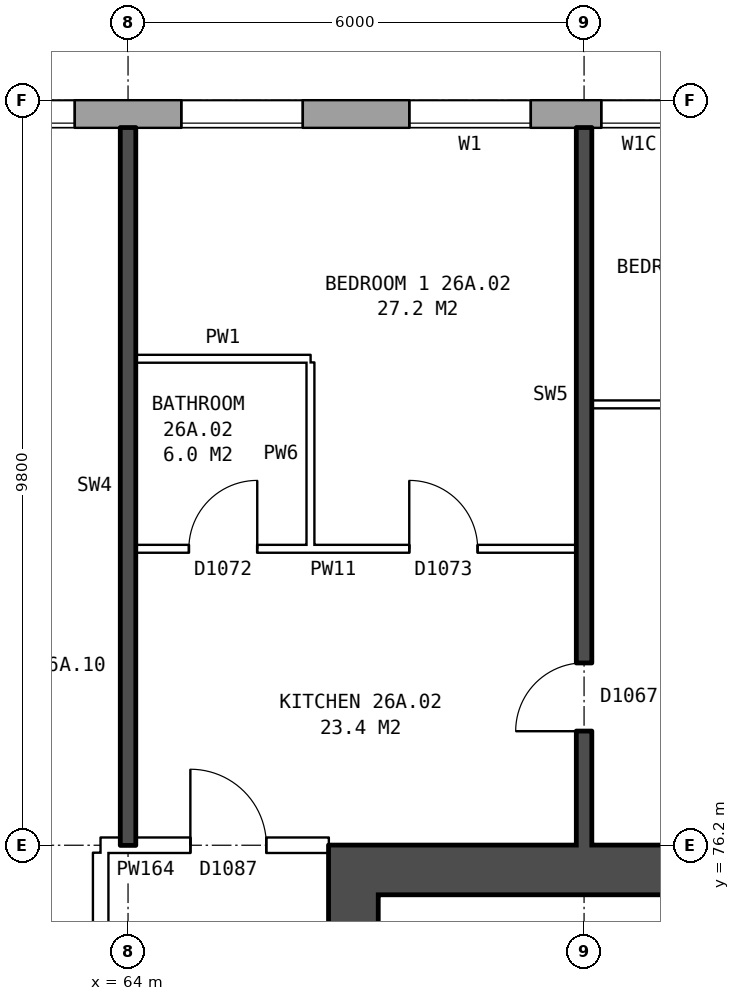
"""IFC4 building model, lengths in metres.
Left out: names, types, materials, properties, quantities, classifications, styles, units other than length and angle.
Written with IfcOpenShell. Run it as: python <this file> out.ifc"""

import sys

from ifc_helpers import new_model, si_unit, direction, frame, frame_2d, origin, place, context, subcontext, project, spatial, rectangle, extrude, element, fill, save


model = new_model("IFC4")
c1 = context("Model", 3, precision=1e-05, world=origin(), true_north=direction((0.0, 1.0)))
c2 = subcontext(c1, "Body", "Model", "MODEL_VIEW")
j1 = project(units=[si_unit("LENGTHUNIT", "METRE"), si_unit("PLANEANGLEUNIT", "RADIAN")], contexts=[c1])
p1 = place(None, origin())
s1 = spatial("IfcSite", under=j1, at=p1, CompositionType="ELEMENT")
p2 = place(p1, origin())
s2 = spatial("IfcBuilding", under=s1, at=p2, CompositionType="ELEMENT")
p3 = place(p2, frame((0.0, 0.0, 96.4)))
s3 = spatial("IfcBuildingStorey", under=s2, at=p3, CompositionType="ELEMENT", Elevation=96.4)
p4 = place(p3, frame((72.925, 85.82, 0.0), z_axis=(0.0, 0.0, 1.0), x_axis=(-1.0, 0.0, 0.0)))
e1 = element("IfcWall", 1, at=p4, inside=s3, PredefinedType="STANDARD", context=c2, shape_type="SweptSolid", body=[
    extrude(rectangle(XDim=44.851, YDim=0.36, at=frame_2d((22.425, 0.0))), origin(), (0.0, 0.0, 1.0), 2.85),
])
p5 = place(p4, frame((0.4, 0.0, 0.8)))
e2 = element("IfcOpeningElement", 2, at=p5, cuts=e1, PredefinedType="OPENING", context=c2, shape_type="SweptSolid", body=[
    extrude(rectangle(XDim=1.0, YDim=0.9, at=frame_2d((0.5, 0.45))), frame((0.0, 0.19, 0.0), z_axis=(0.0, -1.0, 0.0), x_axis=(1.0, 0.0, 0.0)), (0.0, 0.0, 1.0), 0.38),
])
p6 = place(p4, frame((3.625, 0.0, 0.8)))
e3 = element("IfcOpeningElement", 3, at=p6, cuts=e1, PredefinedType="OPENING", context=c2, shape_type="SweptSolid", body=[
    extrude(rectangle(XDim=1.6, YDim=1.8, at=frame_2d((0.8, 0.9))), frame((0.0, 0.19, 0.0), z_axis=(0.0, -1.0, 0.0), x_axis=(1.0, 0.0, 0.0)), (0.0, 0.0, 1.0), 0.38),
])
p7 = place(p4, frame((6.625, 0.0, 0.8)))
e4 = element("IfcOpeningElement", 4, at=p7, cuts=e1, PredefinedType="OPENING", context=c2, shape_type="SweptSolid", body=[
    extrude(rectangle(XDim=1.6, YDim=1.8, at=frame_2d((0.8, 0.9))), frame((0.0, 0.19, 0.0), z_axis=(0.0, -1.0, 0.0), x_axis=(1.0, 0.0, 0.0)), (0.0, 0.0, 1.0), 0.38),
])
p8 = place(p4, frame((9.625, 0.0, 0.8)))
e5 = element("IfcOpeningElement", 5, at=p8, cuts=e1, PredefinedType="OPENING", context=c2, shape_type="SweptSolid", body=[
    extrude(rectangle(XDim=1.6, YDim=1.8, at=frame_2d((0.8, 0.9))), frame((0.0, 0.19, 0.0), z_axis=(0.0, -1.0, 0.0), x_axis=(1.0, 0.0, 0.0)), (0.0, 0.0, 1.0), 0.38),
])
p9 = place(p4, frame((12.625, 0.0, 0.8)))
e6 = element("IfcOpeningElement", 6, at=p9, cuts=e1, PredefinedType="OPENING", context=c2, shape_type="SweptSolid", body=[
    extrude(rectangle(XDim=1.6, YDim=1.8, at=frame_2d((0.8, 0.9))), frame((0.0, 0.19, 0.0), z_axis=(0.0, -1.0, 0.0), x_axis=(1.0, 0.0, 0.0)), (0.0, 0.0, 1.0), 0.38),
])
p10 = place(p4, frame((15.625, 0.0, 0.8)))
e7 = element("IfcOpeningElement", 7, at=p10, cuts=e1, PredefinedType="OPENING", context=c2, shape_type="SweptSolid", body=[
    extrude(rectangle(XDim=1.6, YDim=1.8, at=frame_2d((0.8, 0.9))), frame((0.0, 0.19, 0.0), z_axis=(0.0, -1.0, 0.0), x_axis=(1.0, 0.0, 0.0)), (0.0, 0.0, 1.0), 0.38),
])
p11 = place(p4, frame((18.625, 0.0, 0.8)))
e8 = element("IfcOpeningElement", 8, at=p11, cuts=e1, PredefinedType="OPENING", context=c2, shape_type="SweptSolid", body=[
    extrude(rectangle(XDim=1.6, YDim=1.8, at=frame_2d((0.8, 0.9))), frame((0.0, 0.19, 0.0), z_axis=(0.0, -1.0, 0.0), x_axis=(1.0, 0.0, 0.0)), (0.0, 0.0, 1.0), 0.38),
])
p12 = place(p4, frame((21.625, 0.0, 0.8)))
e9 = element("IfcOpeningElement", 9, at=p12, cuts=e1, PredefinedType="OPENING", context=c2, shape_type="SweptSolid", body=[
    extrude(rectangle(XDim=1.6, YDim=1.8, at=frame_2d((0.8, 0.9))), frame((0.0, 0.19, 0.0), z_axis=(0.0, -1.0, 0.0), x_axis=(1.0, 0.0, 0.0)), (0.0, 0.0, 1.0), 0.38),
])
p13 = place(p4, frame((24.625, 0.0, 0.8)))
e10 = element("IfcOpeningElement", 10, at=p13, cuts=e1, PredefinedType="OPENING", context=c2, shape_type="SweptSolid", body=[
    extrude(rectangle(XDim=1.6, YDim=1.8, at=frame_2d((0.8, 0.9))), frame((0.0, 0.19, 0.0), z_axis=(0.0, -1.0, 0.0), x_axis=(1.0, 0.0, 0.0)), (0.0, 0.0, 1.0), 0.38),
])
p14 = place(p4, frame((27.625, 0.0, 0.8)))
e11 = element("IfcOpeningElement", 11, at=p14, cuts=e1, PredefinedType="OPENING", context=c2, shape_type="SweptSolid", body=[
    extrude(rectangle(XDim=1.6, YDim=1.8, at=frame_2d((0.8, 0.9))), frame((0.0, 0.19, 0.0), z_axis=(0.0, -1.0, 0.0), x_axis=(1.0, 0.0, 0.0)), (0.0, 0.0, 1.0), 0.38),
])
p15 = place(p4, frame((30.625, 0.0, 0.8)))
e12 = element("IfcOpeningElement", 12, at=p15, cuts=e1, PredefinedType="OPENING", context=c2, shape_type="SweptSolid", body=[
    extrude(rectangle(XDim=1.6, YDim=1.8, at=frame_2d((0.8, 0.9))), frame((0.0, 0.19, 0.0), z_axis=(0.0, -1.0, 0.0), x_axis=(1.0, 0.0, 0.0)), (0.0, 0.0, 1.0), 0.38),
])
p16 = place(p4, frame((33.625, 0.0, 0.8)))
e13 = element("IfcOpeningElement", 13, at=p16, cuts=e1, PredefinedType="OPENING", context=c2, shape_type="SweptSolid", body=[
    extrude(rectangle(XDim=1.6, YDim=1.8, at=frame_2d((0.8, 0.9))), frame((0.0, 0.19, 0.0), z_axis=(0.0, -1.0, 0.0), x_axis=(1.0, 0.0, 0.0)), (0.0, 0.0, 1.0), 0.38),
])
p17 = place(p4, frame((36.625, 0.0, 0.8)))
e14 = element("IfcOpeningElement", 14, at=p17, cuts=e1, PredefinedType="OPENING", context=c2, shape_type="SweptSolid", body=[
    extrude(rectangle(XDim=1.6, YDim=1.8, at=frame_2d((0.8, 0.9))), frame((0.0, 0.19, 0.0), z_axis=(0.0, -1.0, 0.0), x_axis=(1.0, 0.0, 0.0)), (0.0, 0.0, 1.0), 0.38),
])
p18 = place(p4, frame((39.625, 0.0, 0.8)))
e15 = element("IfcOpeningElement", 15, at=p18, cuts=e1, PredefinedType="OPENING", context=c2, shape_type="SweptSolid", body=[
    extrude(rectangle(XDim=1.6, YDim=1.8, at=frame_2d((0.8, 0.9))), frame((0.0, 0.19, 0.0), z_axis=(0.0, -1.0, 0.0), x_axis=(1.0, 0.0, 0.0)), (0.0, 0.0, 1.0), 0.38),
])
p19 = place(p4, frame((41.525, 0.0, 0.8)))
e16 = element("IfcOpeningElement", 16, at=p19, cuts=e1, PredefinedType="OPENING", context=c2, shape_type="SweptSolid", body=[
    extrude(rectangle(XDim=1.6, YDim=1.8, at=frame_2d((0.8, 0.9))), frame((0.0, 0.19, 0.0), z_axis=(0.0, -1.0, 0.0), x_axis=(1.0, 0.0, 0.0)), (0.0, 0.0, 1.0), 0.38),
])
p20 = place(p4, frame((1.7, 0.0, 0.8)))
e17 = element("IfcOpeningElement", 17, at=p20, cuts=e1, PredefinedType="OPENING", context=c2, shape_type="SweptSolid", body=[
    extrude(rectangle(XDim=1.0, YDim=1.8, at=frame_2d((0.5, 0.9))), frame((0.0, 0.19, 0.0), z_axis=(0.0, -1.0, 0.0), x_axis=(1.0, 0.0, 0.0)), (0.0, 0.0, 1.0), 0.38),
])
p21 = place(p4, frame((43.425, 0.0, 0.8)))
e18 = element("IfcOpeningElement", 18, at=p21, cuts=e1, PredefinedType="OPENING", context=c2, shape_type="SweptSolid", body=[
    extrude(rectangle(XDim=0.6, YDim=1.2, at=frame_2d((0.3, 0.6))), frame((0.0, 0.19, 0.0), z_axis=(0.0, -1.0, 0.0), x_axis=(1.0, 0.0, 0.0)), (0.0, 0.0, 1.0), 0.38),
])
p22 = place(p3, frame((66.965, 64.45, 0.0), z_axis=(0.0, 0.0, 1.0), x_axis=(0.0, 1.0, 0.0)))
e19 = element("IfcWall", 19, at=p22, inside=s3, PredefinedType="SHEAR", context=c2, shape_type="SweptSolid", body=[
    extrude(rectangle(XDim=11.1, YDim=0.65, at=frame_2d((5.55, 0.0))), origin(), (0.0, 0.0, 1.0), 2.85),
])
p23 = place(p22, frame((0.675, 0.0, 0.0)))
e20 = element("IfcOpeningElement", 20, at=p23, cuts=e19, PredefinedType="OPENING", context=c2, shape_type="SweptSolid", body=[
    extrude(rectangle(XDim=1.1, YDim=2.1, at=frame_2d((0.55, 1.05))), frame((0.0, 0.335, 0.0), z_axis=(0.0, -1.0, 0.0), x_axis=(1.0, 0.0, 0.0)), (0.0, 0.0, 1.0), 0.67),
])
p24 = place(p22, frame((9.25, 0.0, 0.0)))
e21 = element("IfcOpeningElement", 21, at=p24, cuts=e19, PredefinedType="OPENING", context=c2, shape_type="SweptSolid", body=[
    extrude(rectangle(XDim=1.1, YDim=2.1, at=frame_2d((0.55, 1.05))), frame((0.0, 0.335, 0.0), z_axis=(0.0, -1.0, 0.0), x_axis=(1.0, 0.0, 0.0)), (0.0, 0.0, 1.0), 0.67),
])
p25 = place(p3, frame((66.64, 75.875, 0.0), z_axis=(0.0, 0.0, 1.0), x_axis=(1.0, 0.0, 0.0)))
e22 = element("IfcWall", 22, at=p25, inside=s3, PredefinedType="SHEAR", context=c2, shape_type="SweptSolid", body=[
    extrude(rectangle(XDim=9.0, YDim=0.65, at=frame_2d((4.5, 0.0))), origin(), (0.0, 0.0, 1.0), 2.85),
])
p26 = place(p3, frame((63.64, 63.9, 0.0), z_axis=(0.0, 0.0, 1.0), x_axis=(0.0, 1.0, 0.0)))
e23 = element("IfcWall", 23, at=p26, inside=s3, PredefinedType="PARTITIONING", context=c2, shape_type="SweptSolid", body=[
    extrude(rectangle(XDim=12.2, YDim=0.2, at=frame_2d((6.1, 0.0))), origin(), (0.0, 0.0, 1.0), 2.85),
])
p27 = place(p26, frame((5.1, 0.0, 0.0)))
e24 = element("IfcOpeningElement", 24, at=p27, cuts=e23, PredefinedType="OPENING", context=c2, shape_type="SweptSolid", body=[
    extrude(rectangle(XDim=2.0, YDim=2.1, at=frame_2d((1.0, 1.05))), frame((0.0, 0.11, 0.0), z_axis=(0.0, -1.0, 0.0), x_axis=(1.0, 0.0, 0.0)), (0.0, 0.0, 1.0), 0.22),
])
p28 = place(p3, frame((63.64, 76.2, 0.0), z_axis=(0.0, 0.0, 1.0), x_axis=(1.0, 0.0, 0.0)))
e25 = element("IfcWall", 25, at=p28, inside=s3, PredefinedType="PARTITIONING", context=c2, shape_type="SweptSolid", body=[
    extrude(rectangle(XDim=3.0, YDim=0.2, at=frame_2d((1.5, 0.0))), origin(), (0.0, 0.0, 1.0), 2.85),
])
p29 = place(p28, frame((1.18, 0.0, 0.0)))
e26 = element("IfcOpeningElement", 26, at=p29, cuts=e25, PredefinedType="OPENING", context=c2, shape_type="SweptSolid", body=[
    extrude(rectangle(XDim=1.0, YDim=2.1, at=frame_2d((0.5, 1.05))), frame((0.0, 0.11, 0.0), z_axis=(0.0, -1.0, 0.0), x_axis=(1.0, 0.0, 0.0)), (0.0, 0.0, 1.0), 0.22),
])
p30 = place(p3, frame((64.1, 80.1, 0.0), z_axis=(0.0, 0.0, 1.0), x_axis=(1.0, 0.0, 0.0)))
e27 = element("IfcWall", 27, at=p30, inside=s3, PredefinedType="PARTITIONING", context=c2, shape_type="SweptSolid", body=[
    extrude(rectangle(XDim=5.8, YDim=0.1, at=frame_2d((2.9, 0.0))), origin(), (0.0, 0.0, 1.0), 2.85),
])
p31 = place(p30, frame((3.6, 0.0, 0.0)))
e28 = element("IfcOpeningElement", 28, at=p31, cuts=e27, PredefinedType="OPENING", context=c2, shape_type="SweptSolid", body=[
    extrude(rectangle(XDim=0.9, YDim=2.1, at=frame_2d((0.45, 1.05))), frame((0.0, 0.06, 0.0), z_axis=(0.0, -1.0, 0.0), x_axis=(1.0, 0.0, 0.0)), (0.0, 0.0, 1.0), 0.12),
])
p32 = place(p30, frame((0.7, 0.0, 0.0)))
e29 = element("IfcOpeningElement", 29, at=p32, cuts=e27, PredefinedType="OPENING", context=c2, shape_type="SweptSolid", body=[
    extrude(rectangle(XDim=0.9, YDim=2.1, at=frame_2d((0.45, 1.05))), frame((0.0, 0.06, 0.0), z_axis=(0.0, -1.0, 0.0), x_axis=(1.0, 0.0, 0.0)), (0.0, 0.0, 1.0), 0.12),
])
p33 = place(p3, frame((70.1, 82.0, 0.0), z_axis=(0.0, 0.0, 1.0), x_axis=(1.0, 0.0, 0.0)))
e30 = element("IfcWall", 30, at=p33, inside=s3, PredefinedType="PARTITIONING", context=c2, shape_type="SweptSolid", body=[
    extrude(rectangle(XDim=5.54, YDim=0.1, at=frame_2d((2.77, 0.0))), origin(), (0.0, 0.0, 1.0), 2.85),
])
p34 = place(p33, frame((2.32, 0.0, 0.0)))
e31 = element("IfcOpeningElement", 31, at=p34, cuts=e30, PredefinedType="OPENING", context=c2, shape_type="SweptSolid", body=[
    extrude(rectangle(XDim=0.9, YDim=2.1, at=frame_2d((0.45, 1.05))), frame((0.0, 0.06, 0.0), z_axis=(0.0, -1.0, 0.0), x_axis=(1.0, 0.0, 0.0)), (0.0, 0.0, 1.0), 0.12),
])
p35 = place(p3, frame((64.1, 82.6, 0.0), z_axis=(0.0, 0.0, 1.0), x_axis=(1.0, 0.0, 0.0)))
e32 = element("IfcWall", 32, at=p35, inside=s3, PredefinedType="PARTITIONING", context=c2, shape_type="SweptSolid", body=[
    extrude(rectangle(XDim=2.3, YDim=0.1, at=frame_2d((1.15, 0.0))), origin(), (0.0, 0.0, 1.0), 2.85),
])
p36 = place(p3, frame((64.0, 76.2, 0.0), z_axis=(0.0, 0.0, 1.0), x_axis=(0.0, 1.0, 0.0)))
e33 = element("IfcWall", 33, at=p36, inside=s3, PredefinedType="SOLIDWALL", context=c2, shape_type="SweptSolid", body=[
    extrude(rectangle(XDim=9.44, YDim=0.2, at=frame_2d((4.72, 0.0))), origin(), (0.0, 0.0, 1.0), 2.85),
])
p37 = place(p3, frame((66.4, 80.15, 0.0), z_axis=(0.0, 0.0, 1.0), x_axis=(0.0, 1.0, 0.0)))
e34 = element("IfcWall", 34, at=p37, inside=s3, PredefinedType="PARTITIONING", context=c2, shape_type="SweptSolid", body=[
    extrude(rectangle(XDim=2.4, YDim=0.1, at=frame_2d((1.2, 0.0))), origin(), (0.0, 0.0, 1.0), 2.85),
])
p38 = place(p3, frame((70.0, 76.2, 0.0), z_axis=(0.0, 0.0, 1.0), x_axis=(0.0, 1.0, 0.0)))
e35 = element("IfcWall", 35, at=p38, inside=s3, PredefinedType="SOLIDWALL", context=c2, shape_type="SweptSolid", body=[
    extrude(rectangle(XDim=9.44, YDim=0.2, at=frame_2d((4.72, 0.0))), origin(), (0.0, 0.0, 1.0), 2.85),
])
p39 = place(p38, frame((1.5, 0.0, 0.0)))
e36 = element("IfcOpeningElement", 36, at=p39, cuts=e35, PredefinedType="OPENING", context=c2, shape_type="SweptSolid", body=[
    extrude(rectangle(XDim=0.9, YDim=2.1, at=frame_2d((0.45, 1.05))), frame((0.0, 0.11, 0.0), z_axis=(0.0, -1.0, 0.0), x_axis=(1.0, 0.0, 0.0)), (0.0, 0.0, 1.0), 0.22),
])
p40 = place(p6, origin())
e37 = element("IfcWindow", 37, at=p40, inside=s3, PartitioningType="SINGLE_PANEL", PredefinedType="WINDOW", context=c2, shape_type="SweptSolid", body=[
    extrude(rectangle(XDim=1.6, YDim=1.8, at=frame_2d((0.8, 0.9))), frame((0.0, 0.15, 0.0), z_axis=(0.0, -1.0, 0.0), x_axis=(1.0, 0.0, 0.0)), (0.0, 0.0, 1.0), 0.06),
])
fill(e3, e37)
p41 = place(p7, origin())
e38 = element("IfcWindow", 38, at=p41, inside=s3, PartitioningType="SINGLE_PANEL", PredefinedType="WINDOW", context=c2, shape_type="SweptSolid", body=[
    extrude(rectangle(XDim=1.6, YDim=1.8, at=frame_2d((0.8, 0.9))), frame((0.0, 0.15, 0.0), z_axis=(0.0, -1.0, 0.0), x_axis=(1.0, 0.0, 0.0)), (0.0, 0.0, 1.0), 0.06),
])
fill(e4, e38)
p42 = place(p8, origin())
e39 = element("IfcWindow", 39, at=p42, inside=s3, PartitioningType="SINGLE_PANEL", PredefinedType="WINDOW", context=c2, shape_type="SweptSolid", body=[
    extrude(rectangle(XDim=1.6, YDim=1.8, at=frame_2d((0.8, 0.9))), frame((0.0, 0.15, 0.0), z_axis=(0.0, -1.0, 0.0), x_axis=(1.0, 0.0, 0.0)), (0.0, 0.0, 1.0), 0.06),
])
fill(e5, e39)
p43 = place(p31, origin())
e40 = element("IfcDoor", 40, at=p43, inside=s3, OperationType="SINGLE_SWING_LEFT", PredefinedType="DOOR", context=c2, shape_type="SweptSolid", body=[
    extrude(rectangle(XDim=0.9, YDim=2.1, at=frame_2d((0.45, 1.05))), frame((0.0, 0.025, 0.0), z_axis=(0.0, -1.0, 0.0), x_axis=(1.0, 0.0, 0.0)), (0.0, 0.0, 1.0), 0.05),
])
fill(e28, e40)
p44 = place(p29, origin())
e41 = element("IfcDoor", 41, at=p44, inside=s3, OperationType="SINGLE_SWING_LEFT", PredefinedType="DOOR", context=c2, shape_type="SweptSolid", body=[
    extrude(rectangle(XDim=1.0, YDim=2.1, at=frame_2d((0.5, 1.05))), frame((0.0, 0.025, 0.0), z_axis=(0.0, -1.0, 0.0), x_axis=(1.0, 0.0, 0.0)), (0.0, 0.0, 1.0), 0.05),
])
fill(e26, e41)
p45 = place(p39, origin())
e42 = element("IfcDoor", 42, at=p45, inside=s3, OperationType="SINGLE_SWING_LEFT", PredefinedType="DOOR", context=c2, shape_type="SweptSolid", body=[
    extrude(rectangle(XDim=0.9, YDim=2.1, at=frame_2d((0.45, 1.05))), frame((0.0, 0.025, 0.0), z_axis=(0.0, -1.0, 0.0), x_axis=(1.0, 0.0, 0.0)), (0.0, 0.0, 1.0), 0.05),
])
fill(e36, e42)
p46 = place(p32, origin())
e43 = element("IfcDoor", 43, at=p46, inside=s3, OperationType="SINGLE_SWING_RIGHT", PredefinedType="DOOR", context=c2, shape_type="SweptSolid", body=[
    extrude(rectangle(XDim=0.9, YDim=2.1, at=frame_2d((0.45, 1.05))), frame((0.0, 0.025, 0.0), z_axis=(0.0, -1.0, 0.0), x_axis=(1.0, 0.0, 0.0)), (0.0, 0.0, 1.0), 0.05),
])
fill(e29, e43)
p47 = place(p20, origin())
e44 = element("IfcWindow", 44, at=p47, inside=s3, PartitioningType="SINGLE_PANEL", PredefinedType="WINDOW", context=c2, shape_type="SweptSolid", body=[
    extrude(rectangle(XDim=1.0, YDim=1.8, at=frame_2d((0.5, 0.9))), frame((0.0, 0.15, 0.0), z_axis=(0.0, -1.0, 0.0), x_axis=(1.0, 0.0, 0.0)), (0.0, 0.0, 1.0), 0.06),
])
fill(e17, e44)
save(model, sys.argv[1])
